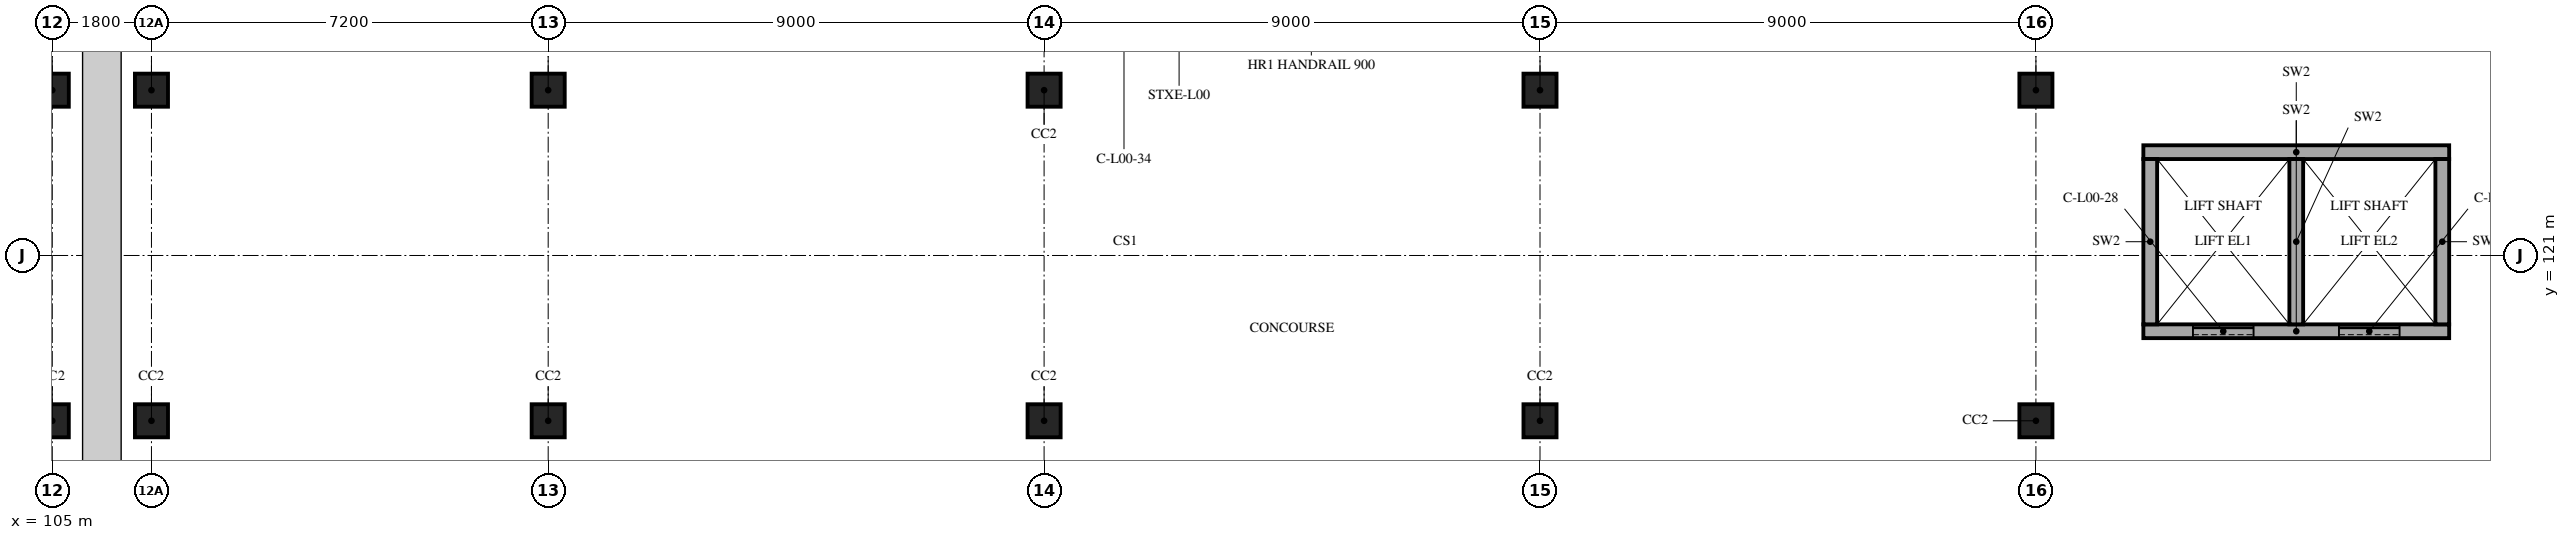
"""IFC4 building model, lengths in metres.
Left out: names, types, materials, properties, quantities, classifications, styles, units other than length and angle.
Written with IfcOpenShell. Run it as: python <this file> out.ifc"""

import sys

from ifc_helpers import new_model, si_unit, direction, frame, frame_2d, origin, origin_2d, place, context, subcontext, project, spatial, rectangle, extrude, element, fill, save


model = new_model("IFC4")
c1 = context("Model", 3, precision=1e-05, world=origin(), true_north=direction((0.0, 1.0)))
c2 = subcontext(c1, "Body", "Model", "MODEL_VIEW")
j1 = project(units=[si_unit("LENGTHUNIT", "METRE"), si_unit("PLANEANGLEUNIT", "RADIAN")], contexts=[c1])
p1 = place(None, origin())
s1 = spatial("IfcSite", under=j1, at=p1, CompositionType="ELEMENT")
p2 = place(p1, origin())
s2 = spatial("IfcBuilding", under=s1, at=p2, CompositionType="ELEMENT")
p3 = place(p2, origin())
s3 = spatial("IfcBuildingStorey", under=s2, at=p3, CompositionType="ELEMENT", Elevation=0.0)
for number, where, z_axis, x_axis in (
    (1, (105.0, 118.0, 0.0), (0.0, 0.0, 1.0), (1.0, 0.0, 0.0)),
    (2, (105.0, 124.0, 0.0), (0.0, 0.0, 1.0), (1.0, 0.0, 0.0)),
    (3, (106.8, 118.0, 0.0), (0.0, 0.0, 1.0), (1.0, 0.0, 0.0)),
    (4, (106.8, 124.0, 0.0), (0.0, 0.0, 1.0), (1.0, 0.0, 0.0)),
    (5, (114.0, 118.0, 0.0), (0.0, 0.0, 1.0), (1.0, 0.0, 0.0)),
    (6, (114.0, 124.0, 0.0), (0.0, 0.0, 1.0), (1.0, 0.0, 0.0)),
    (7, (123.0, 118.0, 0.0), (0.0, 0.0, 1.0), (1.0, 0.0, 0.0)),
    (8, (123.0, 124.0, 0.0), (0.0, 0.0, 1.0), (1.0, 0.0, 0.0)),
    (9, (132.0, 118.0, 0.0), (0.0, 0.0, 1.0), (1.0, 0.0, 0.0)),
    (10, (132.0, 124.0, 0.0), (0.0, 0.0, 1.0), (1.0, 0.0, 0.0)),
    (11, (141.0, 118.0, 0.0), (0.0, 0.0, 1.0), (1.0, 0.0, 0.0)),
    (12, (141.0, 124.0, 0.0), (0.0, 0.0, 1.0), (1.0, 0.0, 0.0)),
):
    element("IfcColumn", number, at=place(p3, frame(where, z_axis=z_axis, x_axis=x_axis)), inside=s3, PredefinedType="COLUMN", context=c2, shape_type="SweptSolid", body=[
        extrude(rectangle(XDim=0.6, YDim=0.6, at=origin_2d()), origin(), (0.0, 0.0, 1.0), 5.0),
    ])
p4 = place(p3, frame((142.95, 119.625, 0.0), z_axis=(0.0, 0.0, 1.0), x_axis=(1.0, 0.0, 0.0)))
e13 = element("IfcWall", 13, at=p4, inside=s3, PredefinedType="SHEAR", context=c2, shape_type="SweptSolid", body=[
    extrude(rectangle(XDim=5.55, YDim=0.25, at=frame_2d((2.775, 0.0))), origin(), (0.0, 0.0, 1.0), 5.0),
])
p5 = place(p4, frame((0.9, 0.0, 0.0)))
e14 = element("IfcOpeningElement", 14, at=p5, cuts=e13, PredefinedType="OPENING", context=c2, shape_type="SweptSolid", body=[
    extrude(rectangle(XDim=1.1, YDim=2.1, at=frame_2d((0.55, 1.05))), frame((0.0, 0.135, 0.0), z_axis=(0.0, -1.0, 0.0), x_axis=(1.0, 0.0, 0.0)), (0.0, 0.0, 1.0), 0.27),
])
p6 = place(p4, frame((3.55, 0.0, 0.0)))
e15 = element("IfcOpeningElement", 15, at=p6, cuts=e13, PredefinedType="OPENING", context=c2, shape_type="SweptSolid", body=[
    extrude(rectangle(XDim=1.1, YDim=2.1, at=frame_2d((0.55, 1.05))), frame((0.0, 0.135, 0.0), z_axis=(0.0, -1.0, 0.0), x_axis=(1.0, 0.0, 0.0)), (0.0, 0.0, 1.0), 0.27),
])
p7 = place(p3, frame((142.95, 122.875, 0.0), z_axis=(0.0, 0.0, 1.0), x_axis=(1.0, 0.0, 0.0)))
e16 = element("IfcWall", 16, at=p7, inside=s3, PredefinedType="SHEAR", context=c2, shape_type="SweptSolid", body=[
    extrude(rectangle(XDim=5.55, YDim=0.25, at=frame_2d((2.775, 0.0))), origin(), (0.0, 0.0, 1.0), 5.0),
])
for number, where, z_axis, x_axis in (
    (17, (143.075, 119.75, 0.0), (0.0, 0.0, 1.0), (0.0, 1.0, 0.0)),
    (18, (148.375, 119.75, 0.0), (0.0, 0.0, 1.0), (0.0, 1.0, 0.0)),
    (19, (145.725, 119.75, 0.0), (0.0, 0.0, 1.0), (0.0, 1.0, 0.0)),
):
    element("IfcWall", number, at=place(p3, frame(where, z_axis=z_axis, x_axis=x_axis)), inside=s3, PredefinedType="SHEAR", context=c2, shape_type="SweptSolid", body=[
        extrude(rectangle(XDim=3.0, YDim=0.25, at=frame_2d((1.5, 0.0))), origin(), (0.0, 0.0, 1.0), 5.0),
    ])
p8 = place(p5, origin())
e20 = element("IfcDoor", 20, at=p8, inside=s3, OperationType="DOUBLE_DOOR_SLIDING", PredefinedType="NOTDEFINED", context=c2, shape_type="SweptSolid", body=[
    extrude(rectangle(XDim=1.1, YDim=2.1, at=frame_2d((0.55, 1.05))), frame((0.0, 0.025, 0.0), z_axis=(0.0, -1.0, 0.0), x_axis=(1.0, 0.0, 0.0)), (0.0, 0.0, 1.0), 0.05),
])
fill(e14, e20)
p9 = place(p6, origin())
e21 = element("IfcDoor", 21, at=p9, inside=s3, OperationType="DOUBLE_DOOR_SLIDING", PredefinedType="NOTDEFINED", context=c2, shape_type="SweptSolid", body=[
    extrude(rectangle(XDim=1.1, YDim=2.1, at=frame_2d((0.55, 1.05))), frame((0.0, 0.025, 0.0), z_axis=(0.0, -1.0, 0.0), x_axis=(1.0, 0.0, 0.0)), (0.0, 0.0, 1.0), 0.05),
])
fill(e15, e21)
save(model, sys.argv[1])
